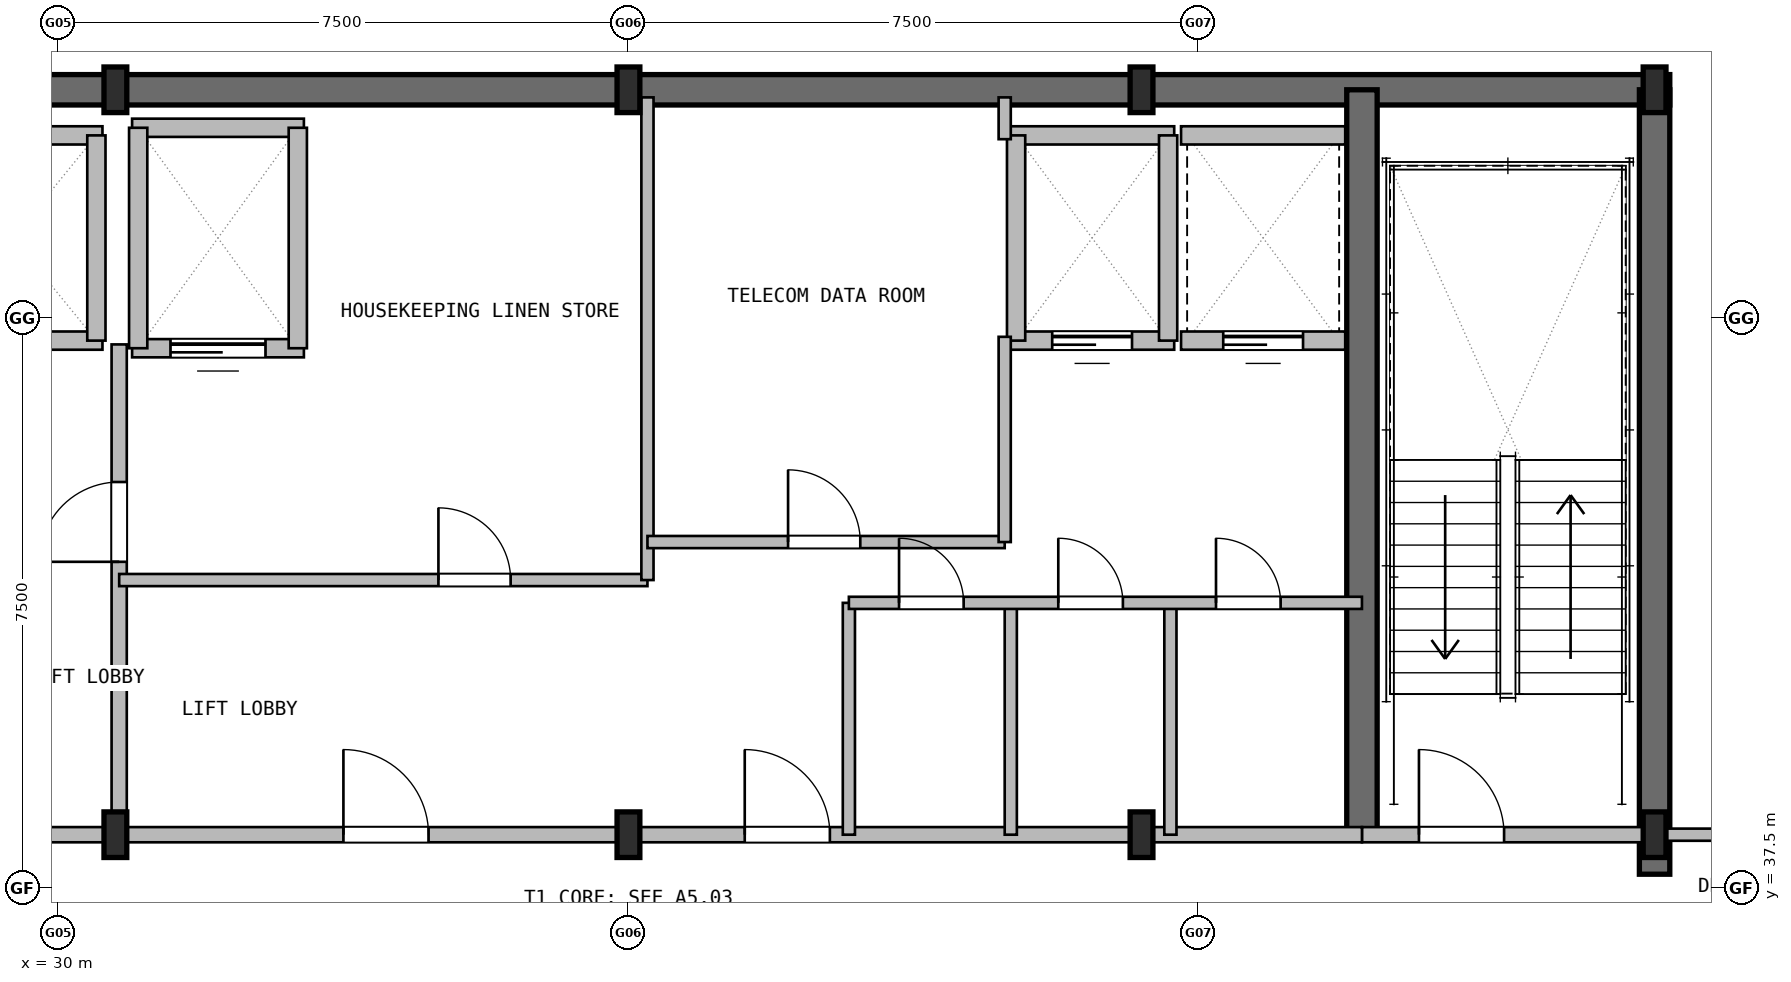
"""IFC4 building model, lengths in metres.
Left out: names, types, materials, properties, quantities, classifications, styles, units other than length and angle.
Written with IfcOpenShell. Run it as: python <this file> out.ifc"""

import sys

from ifc_helpers import new_model, si_unit, direction, frame, frame_2d, origin, origin_2d, place, context, subcontext, project, spatial, rectangle, i_section, extrude, element, fill, save


model = new_model("IFC4")
c1 = context("Model", 3, precision=1e-05, world=origin(), true_north=direction((0.0, 1.0)))
c2 = subcontext(c1, "Body", "Model", "MODEL_VIEW")
j1 = project(units=[si_unit("LENGTHUNIT", "METRE"), si_unit("PLANEANGLEUNIT", "RADIAN")], contexts=[c1])
p1 = place(None, origin())
s1 = spatial("IfcSite", under=j1, at=p1, CompositionType="ELEMENT")
p2 = place(p1, origin())
s2 = spatial("IfcBuilding", under=s1, at=p2, CompositionType="ELEMENT")
p3 = place(p2, frame((0.0, 0.0, 265.8)))
s3 = spatial("IfcBuildingStorey", under=s2, at=p3, CompositionType="ELEMENT", Elevation=265.8)
p4 = place(p3, frame((23.8, 48.0, 0.0), z_axis=(0.0, 0.0, 1.0), x_axis=(1.0, 0.0, 0.0)))
e1 = element("IfcWall", 1, at=p4, inside=s3, PredefinedType="SHEAR", context=c2, shape_type="SweptSolid", body=[
    extrude(rectangle(XDim=27.4, YDim=0.4, at=frame_2d((13.7, 0.0))), origin(), (0.0, 0.0, 1.0), 4.2),
])
p5 = place(p3, frame((51.0, 37.68, 0.0), z_axis=(0.0, 0.0, 1.0), x_axis=(0.0, 1.0, 0.0)))
e2 = element("IfcWall", 2, at=p5, inside=s3, PredefinedType="SHEAR", context=c2, shape_type="SweptSolid", body=[
    extrude(rectangle(XDim=10.32, YDim=0.4, at=frame_2d((5.16, 0.0))), origin(), (0.0, 0.0, 1.0), 4.2),
])
p6 = place(p3, frame((47.15, 38.2, 0.0), z_axis=(0.0, 0.0, 1.0), x_axis=(0.0, 1.0, 0.0)))
e3 = element("IfcWall", 3, at=p6, inside=s3, PredefinedType="SHEAR", context=c2, shape_type="SweptSolid", body=[
    extrude(rectangle(XDim=9.8, YDim=0.4, at=frame_2d((4.9, 0.0))), origin(), (0.0, 0.0, 1.0), 4.2),
])
for number, where, z_axis, x_axis in (
    (4, (30.75, 38.2, 0.0), (0.0, 0.0, 1.0), (1.0, 0.0, 0.0)),
    (5, (30.75, 48.0, 0.0), (0.0, 0.0, 1.0), (1.0, 0.0, 0.0)),
    (6, (37.5, 38.2, 0.0), (0.0, 0.0, 1.0), (1.0, 0.0, 0.0)),
    (7, (37.5, 48.0, 0.0), (0.0, 0.0, 1.0), (1.0, 0.0, 0.0)),
    (8, (44.25, 38.2, 0.0), (0.0, 0.0, 1.0), (1.0, 0.0, 0.0)),
    (9, (44.25, 48.0, 0.0), (0.0, 0.0, 1.0), (1.0, 0.0, 0.0)),
    (10, (51.0, 38.2, 0.0), (0.0, 0.0, 1.0), (1.0, 0.0, 0.0)),
    (11, (51.0, 48.0, 0.0), (0.0, 0.0, 1.0), (1.0, 0.0, 0.0)),
):
    element("IfcColumn", number, at=place(p3, frame(where, z_axis=z_axis, x_axis=x_axis)), inside=s3, PredefinedType="COLUMN", context=c2, shape_type="SweptSolid", body=[
        extrude(i_section(OverallWidth=0.3, OverallDepth=0.6, WebThickness=0.014, FlangeThickness=0.025, at=origin_2d()), origin(), (0.0, 0.0, 1.0), 4.2),
    ])
p7 = place(p3, frame((47.15, 38.2, 0.0), z_axis=(0.0, 0.0, 1.0), x_axis=(1.0, 0.0, 0.0)))
e12 = element("IfcWall", 12, at=p7, inside=s3, PredefinedType="PARTITIONING", context=c2, shape_type="SweptSolid", body=[
    extrude(rectangle(XDim=3.85, YDim=0.2, at=frame_2d((1.925, 0.0))), origin(), (0.0, 0.0, 1.0), 3.33),
])
p8 = place(p7, frame((0.75, 0.0, 0.0)))
e13 = element("IfcOpeningElement", 13, at=p8, cuts=e12, PredefinedType="OPENING", context=c2, shape_type="SweptSolid", body=[
    extrude(rectangle(XDim=1.12, YDim=2.1, at=frame_2d((0.56, 1.05))), frame((0.0, 0.11, 0.0), z_axis=(0.0, -1.0, 0.0), x_axis=(1.0, 0.0, 0.0)), (0.0, 0.0, 1.0), 0.22),
])
p9 = place(p3, frame((30.8, 38.2, 0.0), z_axis=(0.0, 0.0, 1.0), x_axis=(0.0, 1.0, 0.0)))
e14 = element("IfcWall", 14, at=p9, inside=s3, PredefinedType="PARTITIONING", context=c2, shape_type="SweptSolid", body=[
    extrude(rectangle(XDim=6.45, YDim=0.2, at=frame_2d((3.225, 0.0))), origin(), (0.0, 0.0, 1.0), 3.33),
])
p10 = place(p9, frame((3.59, 0.0, 0.0)))
e15 = element("IfcOpeningElement", 15, at=p10, cuts=e14, PredefinedType="OPENING", context=c2, shape_type="SweptSolid", body=[
    extrude(rectangle(XDim=1.05, YDim=2.1, at=frame_2d((0.525, 1.05))), frame((0.0, 0.11, 0.0), z_axis=(0.0, -1.0, 0.0), x_axis=(1.0, 0.0, 0.0)), (0.0, 0.0, 1.0), 0.22),
])
p11 = place(p3, frame((27.95, 38.2, 0.0), z_axis=(0.0, 0.0, 1.0), x_axis=(1.0, 0.0, 0.0)))
e16 = element("IfcWall", 16, at=p11, inside=s3, PredefinedType="PARTITIONING", context=c2, shape_type="SweptSolid", body=[
    extrude(rectangle(XDim=2.85, YDim=0.2, at=frame_2d((1.425, 0.0))), origin(), (0.0, 0.0, 1.0), 3.33),
])
p12 = place(p11, frame((0.75, 0.0, 0.0)))
e17 = element("IfcOpeningElement", 17, at=p12, cuts=e16, PredefinedType="OPENING", context=c2, shape_type="SweptSolid", body=[
    extrude(rectangle(XDim=1.05, YDim=2.1, at=frame_2d((0.525, 1.05))), frame((0.0, 0.11, 0.0), z_axis=(0.0, -1.0, 0.0), x_axis=(1.0, 0.0, 0.0)), (0.0, 0.0, 1.0), 0.22),
])
p13 = place(p3, frame((30.8, 38.2, 0.0), z_axis=(0.0, 0.0, 1.0), x_axis=(1.0, 0.0, 0.0)))
e18 = element("IfcWall", 18, at=p13, inside=s3, PredefinedType="PARTITIONING", context=c2, shape_type="SweptSolid", body=[
    extrude(rectangle(XDim=16.35, YDim=0.2, at=frame_2d((8.175, 0.0))), origin(), (0.0, 0.0, 1.0), 3.33),
])
p14 = place(p13, frame((2.95, 0.0, 0.0)))
e19 = element("IfcOpeningElement", 19, at=p14, cuts=e18, PredefinedType="OPENING", context=c2, shape_type="SweptSolid", body=[
    extrude(rectangle(XDim=1.12, YDim=2.1, at=frame_2d((0.56, 1.05))), frame((0.0, 0.11, 0.0), z_axis=(0.0, -1.0, 0.0), x_axis=(1.0, 0.0, 0.0)), (0.0, 0.0, 1.0), 0.22),
])
p15 = place(p13, frame((8.23, 0.0, 0.0)))
e20 = element("IfcOpeningElement", 20, at=p15, cuts=e18, PredefinedType="OPENING", context=c2, shape_type="SweptSolid", body=[
    extrude(rectangle(XDim=1.12, YDim=2.1, at=frame_2d((0.56, 1.05))), frame((0.0, 0.11, 0.0), z_axis=(0.0, -1.0, 0.0), x_axis=(1.0, 0.0, 0.0)), (0.0, 0.0, 1.0), 0.22),
])
p16 = place(p3, frame((28.22, 44.7, 0.0), z_axis=(0.0, 0.0, 1.0), x_axis=(1.0, 0.0, 0.0)))
e21 = element("IfcWall", 21, at=p16, inside=s3, PredefinedType="PARTITIONING", context=c2, shape_type="SweptSolid", body=[
    extrude(rectangle(XDim=2.36, YDim=0.24, at=frame_2d((1.18, 0.0))), origin(), (0.0, 0.0, 1.0), 3.93),
])
p17 = place(p16, frame((0.705, 0.0, 0.0)))
e22 = element("IfcOpeningElement", 22, at=p17, cuts=e21, PredefinedType="OPENING", context=c2, shape_type="SweptSolid", body=[
    extrude(rectangle(XDim=0.95, YDim=2.15, at=frame_2d((0.475, 1.075))), frame((0.0, 0.13, 0.0), z_axis=(0.0, -1.0, 0.0), x_axis=(1.0, 0.0, 0.0)), (0.0, 0.0, 1.0), 0.26),
])
p18 = place(p3, frame((28.22, 47.4, 0.0), z_axis=(0.0, 0.0, 1.0), x_axis=(1.0, 0.0, 0.0)))
e23 = element("IfcWall", 23, at=p18, inside=s3, PredefinedType="PARTITIONING", context=c2, shape_type="SweptSolid", body=[
    extrude(rectangle(XDim=2.36, YDim=0.24, at=frame_2d((1.18, 0.0))), origin(), (0.0, 0.0, 1.0), 3.93),
])
p19 = place(p3, frame((30.5, 44.7, 0.0), z_axis=(0.0, 0.0, 1.0), x_axis=(0.0, 1.0, 0.0)))
e24 = element("IfcWall", 24, at=p19, inside=s3, PredefinedType="PARTITIONING", context=c2, shape_type="SweptSolid", body=[
    extrude(rectangle(XDim=2.7, YDim=0.24, at=frame_2d((1.35, 0.0))), origin(), (0.0, 0.0, 1.0), 3.33),
])
p20 = place(p3, frame((30.97, 44.6, 0.0), z_axis=(0.0, 0.0, 1.0), x_axis=(1.0, 0.0, 0.0)))
e25 = element("IfcWall", 25, at=p20, inside=s3, PredefinedType="PARTITIONING", context=c2, shape_type="SweptSolid", body=[
    extrude(rectangle(XDim=2.26, YDim=0.24, at=frame_2d((1.13, 0.0))), origin(), (0.0, 0.0, 1.0), 3.93),
])
p21 = place(p20, frame((0.505, 0.0, 0.0)))
e26 = element("IfcOpeningElement", 26, at=p21, cuts=e25, PredefinedType="OPENING", context=c2, shape_type="SweptSolid", body=[
    extrude(rectangle(XDim=1.25, YDim=2.2, at=frame_2d((0.625, 1.1))), frame((0.0, 0.13, 0.0), z_axis=(0.0, -1.0, 0.0), x_axis=(1.0, 0.0, 0.0)), (0.0, 0.0, 1.0), 0.26),
])
p22 = place(p3, frame((30.97, 47.5, 0.0), z_axis=(0.0, 0.0, 1.0), x_axis=(1.0, 0.0, 0.0)))
e27 = element("IfcWall", 27, at=p22, inside=s3, PredefinedType="PARTITIONING", context=c2, shape_type="SweptSolid", body=[
    extrude(rectangle(XDim=2.26, YDim=0.24, at=frame_2d((1.13, 0.0))), origin(), (0.0, 0.0, 1.0), 3.93),
])
for number, where, z_axis, x_axis in (
    (28, (31.05, 44.6, 0.0), (0.0, 0.0, 1.0), (0.0, 1.0, 0.0)),
    (29, (33.15, 44.6, 0.0), (0.0, 0.0, 1.0), (0.0, 1.0, 0.0)),
):
    element("IfcWall", number, at=place(p3, frame(where, z_axis=z_axis, x_axis=x_axis)), inside=s3, PredefinedType="PARTITIONING", context=c2, shape_type="SweptSolid", body=[
        extrude(rectangle(XDim=2.9, YDim=0.24, at=frame_2d((1.45, 0.0))), origin(), (0.0, 0.0, 1.0), 3.93),
    ])
p23 = place(p3, frame((42.52, 44.7, 0.0), z_axis=(0.0, 0.0, 1.0), x_axis=(1.0, 0.0, 0.0)))
e30 = element("IfcWall", 30, at=p23, inside=s3, PredefinedType="PARTITIONING", context=c2, shape_type="SweptSolid", body=[
    extrude(rectangle(XDim=2.16, YDim=0.24, at=frame_2d((1.08, 0.0))), origin(), (0.0, 0.0, 1.0), 3.93),
])
p24 = place(p23, frame((0.555, 0.0, 0.0)))
e31 = element("IfcOpeningElement", 31, at=p24, cuts=e30, PredefinedType="OPENING", context=c2, shape_type="SweptSolid", body=[
    extrude(rectangle(XDim=1.05, YDim=2.15, at=frame_2d((0.525, 1.075))), frame((0.0, 0.13, 0.0), z_axis=(0.0, -1.0, 0.0), x_axis=(1.0, 0.0, 0.0)), (0.0, 0.0, 1.0), 0.26),
])
p25 = place(p3, frame((42.52, 47.4, 0.0), z_axis=(0.0, 0.0, 1.0), x_axis=(1.0, 0.0, 0.0)))
e32 = element("IfcWall", 32, at=p25, inside=s3, PredefinedType="PARTITIONING", context=c2, shape_type="SweptSolid", body=[
    extrude(rectangle(XDim=2.16, YDim=0.24, at=frame_2d((1.08, 0.0))), origin(), (0.0, 0.0, 1.0), 3.93),
])
for number, where, z_axis, x_axis in (
    (33, (42.6, 44.7, 0.0), (0.0, 0.0, 1.0), (0.0, 1.0, 0.0)),
    (34, (44.6, 44.7, 0.0), (0.0, 0.0, 1.0), (0.0, 1.0, 0.0)),
):
    element("IfcWall", number, at=place(p3, frame(where, z_axis=z_axis, x_axis=x_axis)), inside=s3, PredefinedType="PARTITIONING", context=c2, shape_type="SweptSolid", body=[
        extrude(rectangle(XDim=2.7, YDim=0.24, at=frame_2d((1.35, 0.0))), origin(), (0.0, 0.0, 1.0), 3.93),
    ])
p26 = place(p3, frame((44.77, 44.7, 0.0), z_axis=(0.0, 0.0, 1.0), x_axis=(1.0, 0.0, 0.0)))
e35 = element("IfcWall", 35, at=p26, inside=s3, PredefinedType="PARTITIONING", context=c2, shape_type="SweptSolid", body=[
    extrude(rectangle(XDim=2.16, YDim=0.24, at=frame_2d((1.08, 0.0))), origin(), (0.0, 0.0, 1.0), 3.93),
])
p27 = place(p26, frame((0.555, 0.0, 0.0)))
e36 = element("IfcOpeningElement", 36, at=p27, cuts=e35, PredefinedType="OPENING", context=c2, shape_type="SweptSolid", body=[
    extrude(rectangle(XDim=1.05, YDim=2.15, at=frame_2d((0.525, 1.075))), frame((0.0, 0.13, 0.0), z_axis=(0.0, -1.0, 0.0), x_axis=(1.0, 0.0, 0.0)), (0.0, 0.0, 1.0), 0.26),
])
p28 = place(p3, frame((44.77, 47.4, 0.0), z_axis=(0.0, 0.0, 1.0), x_axis=(1.0, 0.0, 0.0)))
e37 = element("IfcWall", 37, at=p28, inside=s3, PredefinedType="PARTITIONING", context=c2, shape_type="SweptSolid", body=[
    extrude(rectangle(XDim=2.16, YDim=0.24, at=frame_2d((1.08, 0.0))), origin(), (0.0, 0.0, 1.0), 3.93),
])
p29 = place(p3, frame((30.8, 41.55, 0.0), z_axis=(0.0, 0.0, 1.0), x_axis=(1.0, 0.0, 0.0)))
e38 = element("IfcWall", 38, at=p29, inside=s3, PredefinedType="PARTITIONING", context=c2, shape_type="SweptSolid", body=[
    extrude(rectangle(XDim=6.95, YDim=0.16, at=frame_2d((3.475, 0.0))), origin(), (0.0, 0.0, 1.0), 3.93),
])
p30 = place(p29, frame((4.2, 0.0, 0.0)))
e39 = element("IfcOpeningElement", 39, at=p30, cuts=e38, PredefinedType="OPENING", context=c2, shape_type="SweptSolid", body=[
    extrude(rectangle(XDim=0.95, YDim=2.1, at=frame_2d((0.475, 1.05))), frame((0.0, 0.09, 0.0), z_axis=(0.0, -1.0, 0.0), x_axis=(1.0, 0.0, 0.0)), (0.0, 0.0, 1.0), 0.18),
])
p31 = place(p3, frame((37.75, 41.55, 0.0), z_axis=(0.0, 0.0, 1.0), x_axis=(0.0, 1.0, 0.0)))
e40 = element("IfcWall", 40, at=p31, inside=s3, PredefinedType="PARTITIONING", context=c2, shape_type="SweptSolid", body=[
    extrude(rectangle(XDim=6.35, YDim=0.16, at=frame_2d((3.175, 0.0))), origin(), (0.0, 0.0, 1.0), 3.93),
])
p32 = place(p3, frame((37.75, 42.05, 0.0), z_axis=(0.0, 0.0, 1.0), x_axis=(1.0, 0.0, 0.0)))
e41 = element("IfcWall", 41, at=p32, inside=s3, PredefinedType="PARTITIONING", context=c2, shape_type="SweptSolid", body=[
    extrude(rectangle(XDim=4.7, YDim=0.16, at=frame_2d((2.35, 0.0))), origin(), (0.0, 0.0, 1.0), 3.93),
])
p33 = place(p32, frame((1.85, 0.0, 0.0)))
e42 = element("IfcOpeningElement", 42, at=p33, cuts=e41, PredefinedType="OPENING", context=c2, shape_type="SweptSolid", body=[
    extrude(rectangle(XDim=0.95, YDim=2.1, at=frame_2d((0.475, 1.05))), frame((0.0, 0.09, 0.0), z_axis=(0.0, -1.0, 0.0), x_axis=(1.0, 0.0, 0.0)), (0.0, 0.0, 1.0), 0.18),
])
p34 = place(p3, frame((42.45, 42.05, 0.0), z_axis=(0.0, 0.0, 1.0), x_axis=(0.0, 1.0, 0.0)))
e43 = element("IfcWall", 43, at=p34, inside=s3, PredefinedType="PARTITIONING", context=c2, shape_type="SweptSolid", body=[
    extrude(rectangle(XDim=2.7, YDim=0.16, at=frame_2d((1.35, 0.0))), origin(), (0.0, 0.0, 1.0), 3.93),
])
p35 = place(p3, frame((42.45, 47.35, 0.0), z_axis=(0.0, 0.0, 1.0), x_axis=(0.0, 1.0, 0.0)))
e44 = element("IfcWall", 44, at=p35, inside=s3, PredefinedType="PARTITIONING", context=c2, shape_type="SweptSolid", body=[
    extrude(rectangle(XDim=0.55, YDim=0.16, at=frame_2d((0.275, 0.0))), origin(), (0.0, 0.0, 1.0), 3.93),
])
for number, where, z_axis, x_axis in (
    (45, (40.4, 38.2, 0.0), (0.0, 0.0, 1.0), (0.0, 1.0, 0.0)),
    (46, (42.53, 38.2, 0.0), (0.0, 0.0, 1.0), (0.0, 1.0, 0.0)),
    (47, (44.63, 38.2, 0.0), (0.0, 0.0, 1.0), (0.0, 1.0, 0.0)),
):
    element("IfcWall", number, at=place(p3, frame(where, z_axis=z_axis, x_axis=x_axis)), inside=s3, PredefinedType="PARTITIONING", context=c2, shape_type="SweptSolid", body=[
        extrude(rectangle(XDim=3.05, YDim=0.16, at=frame_2d((1.525, 0.0))), origin(), (0.0, 0.0, 1.0), 3.93),
    ])
p36 = place(p3, frame((40.4, 41.25, 0.0), z_axis=(0.0, 0.0, 1.0), x_axis=(1.0, 0.0, 0.0)))
e48 = element("IfcWall", 48, at=p36, inside=s3, PredefinedType="PARTITIONING", context=c2, shape_type="SweptSolid", body=[
    extrude(rectangle(XDim=6.75, YDim=0.16, at=frame_2d((3.375, 0.0))), origin(), (0.0, 0.0, 1.0), 3.93),
])
p37 = place(p36, frame((0.66, 0.0, 0.0)))
e49 = element("IfcOpeningElement", 49, at=p37, cuts=e48, PredefinedType="OPENING", context=c2, shape_type="SweptSolid", body=[
    extrude(rectangle(XDim=0.85, YDim=2.05, at=frame_2d((0.425, 1.025))), frame((0.0, 0.09, 0.0), z_axis=(0.0, -1.0, 0.0), x_axis=(1.0, 0.0, 0.0)), (0.0, 0.0, 1.0), 0.18),
])
p38 = place(p36, frame((2.755, 0.0, 0.0)))
e50 = element("IfcOpeningElement", 50, at=p38, cuts=e48, PredefinedType="OPENING", context=c2, shape_type="SweptSolid", body=[
    extrude(rectangle(XDim=0.85, YDim=2.05, at=frame_2d((0.425, 1.025))), frame((0.0, 0.09, 0.0), z_axis=(0.0, -1.0, 0.0), x_axis=(1.0, 0.0, 0.0)), (0.0, 0.0, 1.0), 0.18),
])
p39 = place(p36, frame((4.83, 0.0, 0.0)))
e51 = element("IfcOpeningElement", 51, at=p39, cuts=e48, PredefinedType="OPENING", context=c2, shape_type="SweptSolid", body=[
    extrude(rectangle(XDim=0.85, YDim=2.05, at=frame_2d((0.425, 1.025))), frame((0.0, 0.09, 0.0), z_axis=(0.0, -1.0, 0.0), x_axis=(1.0, 0.0, 0.0)), (0.0, 0.0, 1.0), 0.18),
])
p40 = place(p3, frame((51.0, 38.2, 0.0), z_axis=(0.0, 0.0, 1.0), x_axis=(1.0, 0.0, 0.0)))
e52 = element("IfcWall", 52, at=p40, inside=s3, PredefinedType="PARTITIONING", context=c2, shape_type="SweptSolid", body=[
    extrude(rectangle(XDim=1.4, YDim=0.16, at=frame_2d((0.7, 0.0))), origin(), (0.0, 0.0, 1.0), 3.33),
])
p41 = place(p8, origin())
e53 = element("IfcDoor", 53, at=p41, inside=s3, OperationType="SINGLE_SWING_LEFT", PredefinedType="DOOR", context=c2, shape_type="SweptSolid", body=[
    extrude(rectangle(XDim=1.12, YDim=2.1, at=frame_2d((0.56, 1.05))), frame((0.0, 0.025, 0.0), z_axis=(0.0, -1.0, 0.0), x_axis=(1.0, 0.0, 0.0)), (0.0, 0.0, 1.0), 0.05),
])
fill(e13, e53)
p42 = place(p10, origin())
e54 = element("IfcDoor", 54, at=p42, inside=s3, OperationType="SINGLE_SWING_RIGHT", PredefinedType="DOOR", context=c2, shape_type="SweptSolid", body=[
    extrude(rectangle(XDim=1.05, YDim=2.1, at=frame_2d((0.525, 1.05))), frame((0.0, 0.025, 0.0), z_axis=(0.0, -1.0, 0.0), x_axis=(1.0, 0.0, 0.0)), (0.0, 0.0, 1.0), 0.05),
])
fill(e15, e54)
p43 = place(p14, origin())
e55 = element("IfcDoor", 55, at=p43, inside=s3, OperationType="SINGLE_SWING_RIGHT", PredefinedType="DOOR", context=c2, shape_type="SweptSolid", body=[
    extrude(rectangle(XDim=1.12, YDim=2.1, at=frame_2d((0.56, 1.05))), frame((0.0, 0.025, 0.0), z_axis=(0.0, -1.0, 0.0), x_axis=(1.0, 0.0, 0.0)), (0.0, 0.0, 1.0), 0.05),
])
fill(e19, e55)
p44 = place(p15, origin())
e56 = element("IfcDoor", 56, at=p44, inside=s3, OperationType="SINGLE_SWING_LEFT", PredefinedType="DOOR", context=c2, shape_type="SweptSolid", body=[
    extrude(rectangle(XDim=1.12, YDim=2.1, at=frame_2d((0.56, 1.05))), frame((0.0, 0.025, 0.0), z_axis=(0.0, -1.0, 0.0), x_axis=(1.0, 0.0, 0.0)), (0.0, 0.0, 1.0), 0.05),
])
fill(e20, e56)
p45 = place(p21, origin())
e57 = element("IfcDoor", 57, at=p45, inside=s3, OperationType="SLIDING_TO_LEFT", PredefinedType="DOOR", context=c2, shape_type="SweptSolid", body=[
    extrude(rectangle(XDim=1.25, YDim=2.2, at=frame_2d((0.625, 1.1))), frame((0.0, 0.025, 0.0), z_axis=(0.0, -1.0, 0.0), x_axis=(1.0, 0.0, 0.0)), (0.0, 0.0, 1.0), 0.05),
])
fill(e26, e57)
p46 = place(p24, origin())
e58 = element("IfcDoor", 58, at=p46, inside=s3, OperationType="SLIDING_TO_LEFT", PredefinedType="DOOR", context=c2, shape_type="SweptSolid", body=[
    extrude(rectangle(XDim=1.05, YDim=2.15, at=frame_2d((0.525, 1.075))), frame((0.0, 0.025, 0.0), z_axis=(0.0, -1.0, 0.0), x_axis=(1.0, 0.0, 0.0)), (0.0, 0.0, 1.0), 0.05),
])
fill(e31, e58)
p47 = place(p27, origin())
e59 = element("IfcDoor", 59, at=p47, inside=s3, OperationType="SLIDING_TO_LEFT", PredefinedType="DOOR", context=c2, shape_type="SweptSolid", body=[
    extrude(rectangle(XDim=1.05, YDim=2.15, at=frame_2d((0.525, 1.075))), frame((0.0, 0.025, 0.0), z_axis=(0.0, -1.0, 0.0), x_axis=(1.0, 0.0, 0.0)), (0.0, 0.0, 1.0), 0.05),
])
fill(e36, e59)
p48 = place(p30, origin())
e60 = element("IfcDoor", 60, at=p48, inside=s3, OperationType="SINGLE_SWING_LEFT", PredefinedType="DOOR", context=c2, shape_type="SweptSolid", body=[
    extrude(rectangle(XDim=0.95, YDim=2.1, at=frame_2d((0.475, 1.05))), frame((0.0, 0.025, 0.0), z_axis=(0.0, -1.0, 0.0), x_axis=(1.0, 0.0, 0.0)), (0.0, 0.0, 1.0), 0.05),
])
fill(e39, e60)
p49 = place(p33, origin())
e61 = element("IfcDoor", 61, at=p49, inside=s3, OperationType="SINGLE_SWING_RIGHT", PredefinedType="DOOR", context=c2, shape_type="SweptSolid", body=[
    extrude(rectangle(XDim=0.95, YDim=2.1, at=frame_2d((0.475, 1.05))), frame((0.0, 0.025, 0.0), z_axis=(0.0, -1.0, 0.0), x_axis=(1.0, 0.0, 0.0)), (0.0, 0.0, 1.0), 0.05),
])
fill(e42, e61)
p50 = place(p37, origin())
e62 = element("IfcDoor", 62, at=p50, inside=s3, OperationType="SINGLE_SWING_LEFT", PredefinedType="DOOR", context=c2, shape_type="SweptSolid", body=[
    extrude(rectangle(XDim=0.85, YDim=2.05, at=frame_2d((0.425, 1.025))), frame((0.0, 0.025, 0.0), z_axis=(0.0, -1.0, 0.0), x_axis=(1.0, 0.0, 0.0)), (0.0, 0.0, 1.0), 0.05),
])
fill(e49, e62)
p51 = place(p38, origin())
e63 = element("IfcDoor", 63, at=p51, inside=s3, OperationType="SINGLE_SWING_RIGHT", PredefinedType="DOOR", context=c2, shape_type="SweptSolid", body=[
    extrude(rectangle(XDim=0.85, YDim=2.05, at=frame_2d((0.425, 1.025))), frame((0.0, 0.025, 0.0), z_axis=(0.0, -1.0, 0.0), x_axis=(1.0, 0.0, 0.0)), (0.0, 0.0, 1.0), 0.05),
])
fill(e50, e63)
p52 = place(p39, origin())
e64 = element("IfcDoor", 64, at=p52, inside=s3, OperationType="SINGLE_SWING_LEFT", PredefinedType="DOOR", context=c2, shape_type="SweptSolid", body=[
    extrude(rectangle(XDim=0.85, YDim=2.05, at=frame_2d((0.425, 1.025))), frame((0.0, 0.025, 0.0), z_axis=(0.0, -1.0, 0.0), x_axis=(1.0, 0.0, 0.0)), (0.0, 0.0, 1.0), 0.05),
])
fill(e51, e64)
save(model, sys.argv[1])
